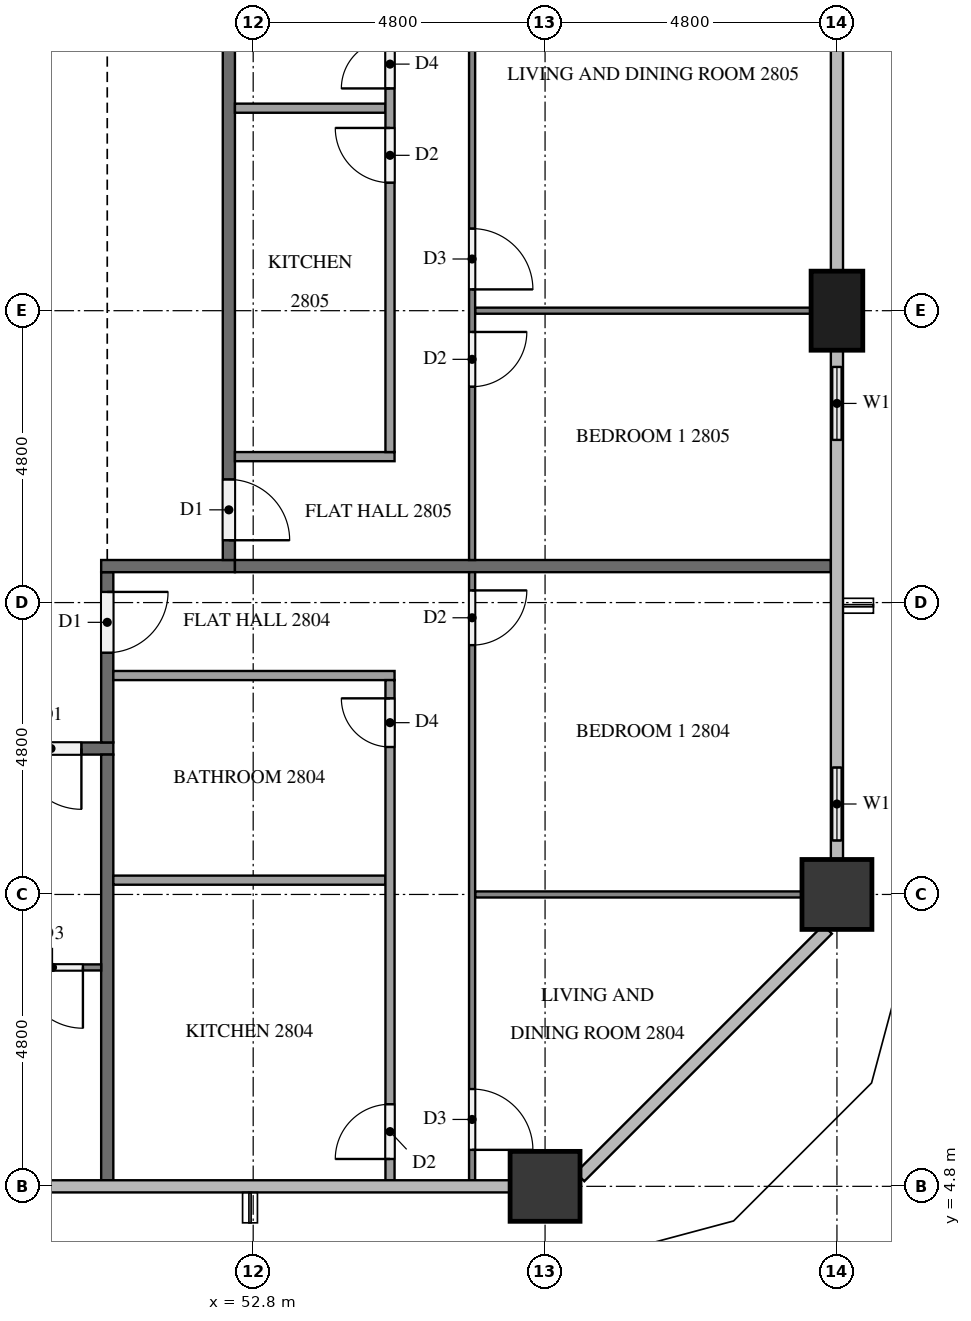
"""IFC4 building model, lengths in metres.
Left out: names, types, materials, properties, quantities, classifications, styles, units other than length and angle.
Written with IfcOpenShell. Run it as: python <this file> out.ifc"""

import sys

from ifc_helpers import new_model, si_unit, direction, frame, frame_2d, origin, origin_2d, place, context, subcontext, project, spatial, rectangle, extrude, element, fill, save


model = new_model("IFC4")
c1 = context("Model", 3, precision=1e-05, world=origin(), true_north=direction((0.0, 1.0)))
c2 = subcontext(c1, "Body", "Model", "MODEL_VIEW")
j1 = project(units=[si_unit("LENGTHUNIT", "METRE"), si_unit("PLANEANGLEUNIT", "RADIAN")], contexts=[c1])
p1 = place(None, origin())
s1 = spatial("IfcSite", under=j1, at=p1, CompositionType="ELEMENT")
p2 = place(p1, origin())
s2 = spatial("IfcBuilding", under=s1, at=p2, CompositionType="ELEMENT")
p3 = place(p2, frame((0.0, 0.0, 110.2)))
s3 = spatial("IfcBuildingStorey", under=s2, at=p3, CompositionType="ELEMENT", Elevation=110.2)
for number, where, z_axis, x_axis in (
    (1, (57.6, 4.8, 0.0), (0.0, 0.0, 1.0), (1.0, 0.0, 0.0)),
    (2, (62.4, 9.6, 0.0), (0.0, 0.0, 1.0), (1.0, 0.0, 0.0)),
):
    element("IfcColumn", number, at=place(p3, frame(where, z_axis=z_axis, x_axis=x_axis)), inside=s3, PredefinedType="COLUMN", context=c2, shape_type="SweptSolid", body=[
        extrude(rectangle(XDim=1.15, YDim=1.15, at=origin_2d()), origin(), (0.0, 0.0, 1.0), 3.1),
    ])
p4 = place(p3, frame((62.4, 19.2, 0.0), z_axis=(0.0, 0.0, 1.0), x_axis=(0.0, 1.0, 0.0)))
e3 = element("IfcColumn", 3, at=p4, inside=s3, PredefinedType="COLUMN", context=c2, shape_type="SweptSolid", body=[
    extrude(rectangle(XDim=1.3, YDim=0.85, at=origin_2d()), origin(), (0.0, 0.0, 1.0), 3.1),
])
p5 = place(p3, frame((62.4, 10.175, 0.0), z_axis=(0.0, 0.0, 1.0), x_axis=(0.0, 1.0, 0.0)))
e4 = element("IfcWall", 4, at=p5, inside=s3, PredefinedType="SOLIDWALL", context=c2, shape_type="SweptSolid", body=[
    extrude(rectangle(XDim=1.825, YDim=0.15, at=frame_2d((0.913, 0.0))), origin(), (0.0, 0.0, 1.0), 3.1),
])
p6 = place(p5, frame((0.312, 0.0, 0.9)))
e5 = element("IfcOpeningElement", 5, at=p6, cuts=e4, PredefinedType="OPENING", context=c2, shape_type="SweptSolid", body=[
    extrude(rectangle(XDim=1.2, YDim=1.4, at=frame_2d((0.6, 0.7))), frame((0.0, 0.085, 0.0), z_axis=(0.0, -1.0, 0.0), x_axis=(1.0, 0.0, 0.0)), (0.0, 0.0, 1.0), 0.17),
])
p7 = place(p3, frame((62.4, 16.8, 0.0), z_axis=(0.0, 0.0, 1.0), x_axis=(0.0, 1.0, 0.0)))
e6 = element("IfcWall", 6, at=p7, inside=s3, PredefinedType="SOLIDWALL", context=c2, shape_type="SweptSolid", body=[
    extrude(rectangle(XDim=1.75, YDim=0.15, at=frame_2d((0.875, 0.0))), origin(), (0.0, 0.0, 1.0), 3.1),
])
p8 = place(p7, frame((0.275, 0.0, 0.9)))
e7 = element("IfcOpeningElement", 7, at=p8, cuts=e6, PredefinedType="OPENING", context=c2, shape_type="SweptSolid", body=[
    extrude(rectangle(XDim=1.2, YDim=1.4, at=frame_2d((0.6, 0.7))), frame((0.0, 0.085, 0.0), z_axis=(0.0, -1.0, 0.0), x_axis=(1.0, 0.0, 0.0)), (0.0, 0.0, 1.0), 0.17),
])
p9 = place(p3, frame((50.5, 12.0, 0.0), z_axis=(0.0, 0.0, 1.0), x_axis=(-1.0, 0.0, 0.0)))
e8 = element("IfcWall", 8, at=p9, inside=s3, PredefinedType="PARTITIONING", context=c2, shape_type="SweptSolid", body=[
    extrude(rectangle(XDim=38.6, YDim=0.2, at=frame_2d((19.3, 0.0))), origin(), (0.0, 0.0, 1.0), 3.1),
])
p10 = place(p9, frame((22.125, 0.0, 0.0)))
e9 = element("IfcOpeningElement", 9, at=p10, cuts=e8, PredefinedType="OPENING", context=c2, shape_type="SweptSolid", body=[
    extrude(rectangle(XDim=1.0, YDim=2.1, at=frame_2d((0.5, 1.05))), frame((0.0, 0.11, 0.0), z_axis=(0.0, -1.0, 0.0), x_axis=(1.0, 0.0, 0.0)), (0.0, 0.0, 1.0), 0.22),
])
p11 = place(p9, frame((20.275, 0.0, 0.0)))
e10 = element("IfcOpeningElement", 10, at=p11, cuts=e8, PredefinedType="OPENING", context=c2, shape_type="SweptSolid", body=[
    extrude(rectangle(XDim=1.0, YDim=2.1, at=frame_2d((0.5, 1.05))), frame((0.0, 0.11, 0.0), z_axis=(0.0, -1.0, 0.0), x_axis=(1.0, 0.0, 0.0)), (0.0, 0.0, 1.0), 0.22),
])
p12 = place(p9, frame((0.525, 0.0, 0.0)))
e11 = element("IfcOpeningElement", 11, at=p12, cuts=e8, PredefinedType="OPENING", context=c2, shape_type="SweptSolid", body=[
    extrude(rectangle(XDim=1.0, YDim=2.1, at=frame_2d((0.5, 1.05))), frame((0.0, 0.11, 0.0), z_axis=(0.0, -1.0, 0.0), x_axis=(1.0, 0.0, 0.0)), (0.0, 0.0, 1.0), 0.22),
])
p13 = place(p3, frame((50.4, 14.9, 0.0), z_axis=(0.0, 0.0, 1.0), x_axis=(0.0, -1.0, 0.0)))
e12 = element("IfcWall", 12, at=p13, inside=s3, PredefinedType="PARTITIONING", context=c2, shape_type="SweptSolid", body=[
    extrude(rectangle(XDim=2.8, YDim=0.2, at=frame_2d((1.4, 0.0))), origin(), (0.0, 0.0, 1.0), 3.1),
])
p14 = place(p13, frame((0.325, 0.0, 0.0)))
e13 = element("IfcOpeningElement", 13, at=p14, cuts=e12, PredefinedType="OPENING", context=c2, shape_type="SweptSolid", body=[
    extrude(rectangle(XDim=1.0, YDim=2.1, at=frame_2d((0.5, 1.05))), frame((0.0, 0.11, 0.0), z_axis=(0.0, -1.0, 0.0), x_axis=(1.0, 0.0, 0.0)), (0.0, 0.0, 1.0), 0.22),
])
p15 = place(p3, frame((50.3, 15.0, 0.0), z_axis=(0.0, 0.0, 1.0), x_axis=(1.0, 0.0, 0.0)))
e14 = element("IfcWall", 14, at=p15, inside=s3, PredefinedType="PARTITIONING", context=c2, shape_type="SweptSolid", body=[
    extrude(rectangle(XDim=2.2, YDim=0.2, at=frame_2d((1.1, 0.0))), origin(), (0.0, 0.0, 1.0), 3.1),
])
p16 = place(p3, frame((52.4, 37.7, 0.0), z_axis=(0.0, 0.0, 1.0), x_axis=(0.0, -1.0, 0.0)))
e15 = element("IfcWall", 15, at=p16, inside=s3, PredefinedType="PARTITIONING", context=c2, shape_type="SweptSolid", body=[
    extrude(rectangle(XDim=22.6, YDim=0.2, at=frame_2d((11.3, 0.0))), origin(), (0.0, 0.0, 1.0), 3.1),
])
p17 = place(p16, frame((21.275, 0.0, 0.0)))
e16 = element("IfcOpeningElement", 16, at=p17, cuts=e15, PredefinedType="OPENING", context=c2, shape_type="SweptSolid", body=[
    extrude(rectangle(XDim=1.0, YDim=2.1, at=frame_2d((0.5, 1.05))), frame((0.0, 0.11, 0.0), z_axis=(0.0, -1.0, 0.0), x_axis=(1.0, 0.0, 0.0)), (0.0, 0.0, 1.0), 0.22),
])
p18 = place(p16, frame((9.875, 0.0, 0.0)))
e17 = element("IfcOpeningElement", 17, at=p18, cuts=e15, PredefinedType="OPENING", context=c2, shape_type="SweptSolid", body=[
    extrude(rectangle(XDim=1.0, YDim=2.1, at=frame_2d((0.5, 1.05))), frame((0.0, 0.11, 0.0), z_axis=(0.0, -1.0, 0.0), x_axis=(1.0, 0.0, 0.0)), (0.0, 0.0, 1.0), 0.22),
])
p19 = place(p3, frame((50.4, 11.9, 0.0), z_axis=(0.0, 0.0, 1.0), x_axis=(0.0, -1.0, 0.0)))
e18 = element("IfcWall", 18, at=p19, inside=s3, PredefinedType="PARTITIONING", context=c2, shape_type="SweptSolid", body=[
    extrude(rectangle(XDim=7.0, YDim=0.2, at=frame_2d((3.5, 0.0))), origin(), (0.0, 0.0, 1.0), 3.1),
])
p20 = place(p3, frame((52.5, 15.0, 0.0), z_axis=(0.0, 0.0, 1.0), x_axis=(1.0, 0.0, 0.0)))
e19 = element("IfcWall", 19, at=p20, inside=s3, PredefinedType="PARTITIONING", context=c2, shape_type="SweptSolid", body=[
    extrude(rectangle(XDim=9.8, YDim=0.2, at=frame_2d((4.9, 0.0))), origin(), (0.0, 0.0, 1.0), 3.1),
])
p21 = place(p3, frame((50.3, 8.4, 0.0), z_axis=(0.0, 0.0, 1.0), x_axis=(-1.0, 0.0, 0.0)))
e20 = element("IfcWall", 20, at=p21, inside=s3, PredefinedType="PARTITIONING", context=c2, shape_type="SweptSolid", body=[
    extrude(rectangle(XDim=11.8, YDim=0.1, at=frame_2d((5.9, 0.0))), origin(), (0.0, 0.0, 1.0), 3.1),
])
p22 = place(p21, frame((0.3, 0.0, 0.0)))
e21 = element("IfcOpeningElement", 21, at=p22, cuts=e20, PredefinedType="OPENING", context=c2, shape_type="SweptSolid", body=[
    extrude(rectangle(XDim=1.0, YDim=2.1, at=frame_2d((0.5, 1.05))), frame((0.0, 0.06, 0.0), z_axis=(0.0, -1.0, 0.0), x_axis=(1.0, 0.0, 0.0)), (0.0, 0.0, 1.0), 0.12),
])
p23 = place(p21, frame((10.6, 0.0, 0.0)))
e22 = element("IfcOpeningElement", 22, at=p23, cuts=e20, PredefinedType="OPENING", context=c2, shape_type="SweptSolid", body=[
    extrude(rectangle(XDim=0.9, YDim=2.1, at=frame_2d((0.45, 1.05))), frame((0.0, 0.06, 0.0), z_axis=(0.0, -1.0, 0.0), x_axis=(1.0, 0.0, 0.0)), (0.0, 0.0, 1.0), 0.12),
])
p24 = place(p3, frame((56.45, 9.6, 0.0), z_axis=(0.0, 0.0, 1.0), x_axis=(1.0, 0.0, 0.0)))
e23 = element("IfcWall", 23, at=p24, inside=s3, PredefinedType="PARTITIONING", context=c2, shape_type="SweptSolid", body=[
    extrude(rectangle(XDim=5.375, YDim=0.1, at=frame_2d((2.688, 0.0))), origin(), (0.0, 0.0, 1.0), 3.1),
])
p25 = place(p3, frame((56.4, 14.9, 0.0), z_axis=(0.0, 0.0, 1.0), x_axis=(0.0, -1.0, 0.0)))
e24 = element("IfcWall", 24, at=p25, inside=s3, PredefinedType="PARTITIONING", context=c2, shape_type="SweptSolid", body=[
    extrude(rectangle(XDim=10.0, YDim=0.1, at=frame_2d((5.0, 0.0))), origin(), (0.0, 0.0, 1.0), 3.1),
])
p26 = place(p25, frame((0.3, 0.0, 0.0)))
e25 = element("IfcOpeningElement", 25, at=p26, cuts=e24, PredefinedType="OPENING", context=c2, shape_type="SweptSolid", body=[
    extrude(rectangle(XDim=0.9, YDim=2.1, at=frame_2d((0.45, 1.05))), frame((0.0, 0.06, 0.0), z_axis=(0.0, -1.0, 0.0), x_axis=(1.0, 0.0, 0.0)), (0.0, 0.0, 1.0), 0.12),
])
p27 = place(p25, frame((8.5, 0.0, 0.0)))
e26 = element("IfcOpeningElement", 26, at=p27, cuts=e24, PredefinedType="OPENING", context=c2, shape_type="SweptSolid", body=[
    extrude(rectangle(XDim=1.0, YDim=2.1, at=frame_2d((0.5, 1.05))), frame((0.0, 0.06, 0.0), z_axis=(0.0, -1.0, 0.0), x_axis=(1.0, 0.0, 0.0)), (0.0, 0.0, 1.0), 0.12),
])
p28 = place(p3, frame((50.5, 9.835, 0.0), z_axis=(0.0, 0.0, 1.0), x_axis=(1.0, 0.0, 0.0)))
e27 = element("IfcWall", 27, at=p28, inside=s3, PredefinedType="PARTITIONING", context=c2, shape_type="SweptSolid", body=[
    extrude(rectangle(XDim=4.475, YDim=0.15, at=frame_2d((2.238, 0.0))), origin(), (0.0, 0.0, 1.0), 3.1),
])
p29 = place(p3, frame((50.5, 13.2, 0.0), z_axis=(0.0, 0.0, 1.0), x_axis=(1.0, 0.0, 0.0)))
e28 = element("IfcWall", 28, at=p29, inside=s3, PredefinedType="PARTITIONING", context=c2, shape_type="SweptSolid", body=[
    extrude(rectangle(XDim=4.625, YDim=0.15, at=frame_2d((2.312, 0.0))), origin(), (0.0, 0.0, 1.0), 3.1),
])
p30 = place(p3, frame((55.05, 4.9, 0.0), z_axis=(0.0, 0.0, 1.0), x_axis=(0.0, 1.0, 0.0)))
e29 = element("IfcWall", 29, at=p30, inside=s3, PredefinedType="PARTITIONING", context=c2, shape_type="SweptSolid", body=[
    extrude(rectangle(XDim=8.225, YDim=0.15, at=frame_2d((4.113, 0.0))), origin(), (0.0, 0.0, 1.0), 3.1),
])
p31 = place(p30, frame((7.125, 0.0, 0.0)))
e30 = element("IfcOpeningElement", 30, at=p31, cuts=e29, PredefinedType="OPENING", context=c2, shape_type="SweptSolid", body=[
    extrude(rectangle(XDim=0.8, YDim=2.1, at=frame_2d((0.4, 1.05))), frame((0.0, 0.085, 0.0), z_axis=(0.0, -1.0, 0.0), x_axis=(1.0, 0.0, 0.0)), (0.0, 0.0, 1.0), 0.17),
])
p32 = place(p30, frame((0.35, 0.0, 0.0)))
e31 = element("IfcOpeningElement", 31, at=p32, cuts=e29, PredefinedType="OPENING", context=c2, shape_type="SweptSolid", body=[
    extrude(rectangle(XDim=0.9, YDim=2.1, at=frame_2d((0.45, 1.05))), frame((0.0, 0.085, 0.0), z_axis=(0.0, -1.0, 0.0), x_axis=(1.0, 0.0, 0.0)), (0.0, 0.0, 1.0), 0.17),
])
p33 = place(p3, frame((56.45, 19.2, 0.0), z_axis=(0.0, 0.0, 1.0), x_axis=(1.0, 0.0, 0.0)))
e32 = element("IfcWall", 32, at=p33, inside=s3, PredefinedType="PARTITIONING", context=c2, shape_type="SweptSolid", body=[
    extrude(rectangle(XDim=5.525, YDim=0.1, at=frame_2d((2.763, 0.0))), origin(), (0.0, 0.0, 1.0), 3.1),
])
p34 = place(p3, frame((56.4, 26.3, 0.0), z_axis=(0.0, 0.0, 1.0), x_axis=(0.0, -1.0, 0.0)))
e33 = element("IfcWall", 33, at=p34, inside=s3, PredefinedType="PARTITIONING", context=c2, shape_type="SweptSolid", body=[
    extrude(rectangle(XDim=11.2, YDim=0.1, at=frame_2d((5.6, 0.0))), origin(), (0.0, 0.0, 1.0), 3.1),
])
p35 = place(p34, frame((7.45, 0.0, 0.0)))
e34 = element("IfcOpeningElement", 34, at=p35, cuts=e33, PredefinedType="OPENING", context=c2, shape_type="SweptSolid", body=[
    extrude(rectangle(XDim=0.9, YDim=2.1, at=frame_2d((0.45, 1.05))), frame((0.0, 0.06, 0.0), z_axis=(0.0, -1.0, 0.0), x_axis=(1.0, 0.0, 0.0)), (0.0, 0.0, 1.0), 0.12),
])
p36 = place(p34, frame((5.75, 0.0, 0.0)))
e35 = element("IfcOpeningElement", 35, at=p36, cuts=e33, PredefinedType="OPENING", context=c2, shape_type="SweptSolid", body=[
    extrude(rectangle(XDim=1.0, YDim=2.1, at=frame_2d((0.5, 1.05))), frame((0.0, 0.06, 0.0), z_axis=(0.0, -1.0, 0.0), x_axis=(1.0, 0.0, 0.0)), (0.0, 0.0, 1.0), 0.12),
])
p37 = place(p3, frame((52.5, 22.53, 0.0), z_axis=(0.0, 0.0, 1.0), x_axis=(1.0, 0.0, 0.0)))
e36 = element("IfcWall", 36, at=p37, inside=s3, PredefinedType="PARTITIONING", context=c2, shape_type="SweptSolid", body=[
    extrude(rectangle(XDim=2.475, YDim=0.15, at=frame_2d((1.238, 0.0))), origin(), (0.0, 0.0, 1.0), 3.1),
])
p38 = place(p3, frame((52.5, 16.8, 0.0), z_axis=(0.0, 0.0, 1.0), x_axis=(1.0, 0.0, 0.0)))
e37 = element("IfcWall", 37, at=p38, inside=s3, PredefinedType="PARTITIONING", context=c2, shape_type="SweptSolid", body=[
    extrude(rectangle(XDim=2.625, YDim=0.15, at=frame_2d((1.312, 0.0))), origin(), (0.0, 0.0, 1.0), 3.1),
])
p39 = place(p3, frame((55.05, 16.875, 0.0), z_axis=(0.0, 0.0, 1.0), x_axis=(0.0, 1.0, 0.0)))
e38 = element("IfcWall", 38, at=p39, inside=s3, PredefinedType="PARTITIONING", context=c2, shape_type="SweptSolid", body=[
    extrude(rectangle(XDim=9.425, YDim=0.15, at=frame_2d((4.712, 0.0))), origin(), (0.0, 0.0, 1.0), 3.1),
])
p40 = place(p39, frame((4.43, 0.0, 0.0)))
e39 = element("IfcOpeningElement", 39, at=p40, cuts=e38, PredefinedType="OPENING", context=c2, shape_type="SweptSolid", body=[
    extrude(rectangle(XDim=0.9, YDim=2.1, at=frame_2d((0.45, 1.05))), frame((0.0, 0.085, 0.0), z_axis=(0.0, -1.0, 0.0), x_axis=(1.0, 0.0, 0.0)), (0.0, 0.0, 1.0), 0.17),
])
p41 = place(p39, frame((5.98, 0.0, 0.0)))
e40 = element("IfcOpeningElement", 40, at=p41, cuts=e38, PredefinedType="OPENING", context=c2, shape_type="SweptSolid", body=[
    extrude(rectangle(XDim=0.8, YDim=2.1, at=frame_2d((0.4, 1.05))), frame((0.0, 0.085, 0.0), z_axis=(0.0, -1.0, 0.0), x_axis=(1.0, 0.0, 0.0)), (0.0, 0.0, 1.0), 0.17),
])
p42 = place(p6, origin())
e41 = element("IfcWindow", 41, at=p42, inside=s3, PartitioningType="SINGLE_PANEL", PredefinedType="WINDOW", context=c2, shape_type="SweptSolid", body=[
    extrude(rectangle(XDim=1.2, YDim=1.4, at=frame_2d((0.6, 0.7))), frame((0.0, 0.03, 0.0), z_axis=(0.0, -1.0, 0.0), x_axis=(1.0, 0.0, 0.0)), (0.0, 0.0, 1.0), 0.06),
])
fill(e5, e41)
p43 = place(p8, origin())
e42 = element("IfcWindow", 42, at=p43, inside=s3, PartitioningType="SINGLE_PANEL", PredefinedType="WINDOW", context=c2, shape_type="SweptSolid", body=[
    extrude(rectangle(XDim=1.2, YDim=1.4, at=frame_2d((0.6, 0.7))), frame((0.0, 0.03, 0.0), z_axis=(0.0, -1.0, 0.0), x_axis=(1.0, 0.0, 0.0)), (0.0, 0.0, 1.0), 0.06),
])
fill(e7, e42)
p44 = place(p12, origin())
e43 = element("IfcDoor", 43, at=p44, inside=s3, OperationType="SINGLE_SWING_LEFT", PredefinedType="DOOR", context=c2, shape_type="SweptSolid", body=[
    extrude(rectangle(XDim=1.0, YDim=2.1, at=frame_2d((0.5, 1.05))), frame((0.0, 0.025, 0.0), z_axis=(0.0, -1.0, 0.0), x_axis=(1.0, 0.0, 0.0)), (0.0, 0.0, 1.0), 0.05),
])
fill(e11, e43)
p45 = place(p14, origin())
e44 = element("IfcDoor", 44, at=p45, inside=s3, OperationType="SINGLE_SWING_LEFT", PredefinedType="DOOR", context=c2, shape_type="SweptSolid", body=[
    extrude(rectangle(XDim=1.0, YDim=2.1, at=frame_2d((0.5, 1.05))), frame((0.0, 0.025, 0.0), z_axis=(0.0, -1.0, 0.0), x_axis=(1.0, 0.0, 0.0)), (0.0, 0.0, 1.0), 0.05),
])
fill(e13, e44)
p46 = place(p17, origin())
e45 = element("IfcDoor", 45, at=p46, inside=s3, OperationType="SINGLE_SWING_RIGHT", PredefinedType="DOOR", context=c2, shape_type="SweptSolid", body=[
    extrude(rectangle(XDim=1.0, YDim=2.1, at=frame_2d((0.5, 1.05))), frame((0.0, 0.025, 0.0), z_axis=(0.0, -1.0, 0.0), x_axis=(1.0, 0.0, 0.0)), (0.0, 0.0, 1.0), 0.05),
])
fill(e16, e45)
p47 = place(p22, origin())
e46 = element("IfcDoor", 46, at=p47, inside=s3, OperationType="SINGLE_SWING_LEFT", PredefinedType="DOOR", context=c2, shape_type="SweptSolid", body=[
    extrude(rectangle(XDim=1.0, YDim=2.1, at=frame_2d((0.5, 1.05))), frame((0.0, 0.025, 0.0), z_axis=(0.0, -1.0, 0.0), x_axis=(1.0, 0.0, 0.0)), (0.0, 0.0, 1.0), 0.05),
])
fill(e21, e46)
p48 = place(p26, origin())
e47 = element("IfcDoor", 47, at=p48, inside=s3, OperationType="SINGLE_SWING_LEFT", PredefinedType="DOOR", context=c2, shape_type="SweptSolid", body=[
    extrude(rectangle(XDim=0.9, YDim=2.1, at=frame_2d((0.45, 1.05))), frame((0.0, 0.025, 0.0), z_axis=(0.0, -1.0, 0.0), x_axis=(1.0, 0.0, 0.0)), (0.0, 0.0, 1.0), 0.05),
])
fill(e25, e47)
p49 = place(p27, origin())
e48 = element("IfcDoor", 48, at=p49, inside=s3, OperationType="SINGLE_SWING_RIGHT", PredefinedType="DOOR", context=c2, shape_type="SweptSolid", body=[
    extrude(rectangle(XDim=1.0, YDim=2.1, at=frame_2d((0.5, 1.05))), frame((0.0, 0.025, 0.0), z_axis=(0.0, -1.0, 0.0), x_axis=(1.0, 0.0, 0.0)), (0.0, 0.0, 1.0), 0.05),
])
fill(e26, e48)
p50 = place(p31, origin())
e49 = element("IfcDoor", 49, at=p50, inside=s3, OperationType="SINGLE_SWING_RIGHT", PredefinedType="DOOR", context=c2, shape_type="SweptSolid", body=[
    extrude(rectangle(XDim=0.8, YDim=2.1, at=frame_2d((0.4, 1.05))), frame((0.0, 0.025, 0.0), z_axis=(0.0, -1.0, 0.0), x_axis=(1.0, 0.0, 0.0)), (0.0, 0.0, 1.0), 0.05),
])
fill(e30, e49)
p51 = place(p32, origin())
e50 = element("IfcDoor", 50, at=p51, inside=s3, OperationType="SINGLE_SWING_LEFT", PredefinedType="DOOR", context=c2, shape_type="SweptSolid", body=[
    extrude(rectangle(XDim=0.9, YDim=2.1, at=frame_2d((0.45, 1.05))), frame((0.0, 0.025, 0.0), z_axis=(0.0, -1.0, 0.0), x_axis=(1.0, 0.0, 0.0)), (0.0, 0.0, 1.0), 0.05),
])
fill(e31, e50)
p52 = place(p35, origin())
e51 = element("IfcDoor", 51, at=p52, inside=s3, OperationType="SINGLE_SWING_LEFT", PredefinedType="DOOR", context=c2, shape_type="SweptSolid", body=[
    extrude(rectangle(XDim=0.9, YDim=2.1, at=frame_2d((0.45, 1.05))), frame((0.0, 0.025, 0.0), z_axis=(0.0, -1.0, 0.0), x_axis=(1.0, 0.0, 0.0)), (0.0, 0.0, 1.0), 0.05),
])
fill(e34, e51)
p53 = place(p36, origin())
e52 = element("IfcDoor", 52, at=p53, inside=s3, OperationType="SINGLE_SWING_RIGHT", PredefinedType="DOOR", context=c2, shape_type="SweptSolid", body=[
    extrude(rectangle(XDim=1.0, YDim=2.1, at=frame_2d((0.5, 1.05))), frame((0.0, 0.025, 0.0), z_axis=(0.0, -1.0, 0.0), x_axis=(1.0, 0.0, 0.0)), (0.0, 0.0, 1.0), 0.05),
])
fill(e35, e52)
p54 = place(p40, origin())
e53 = element("IfcDoor", 53, at=p54, inside=s3, OperationType="SINGLE_SWING_RIGHT", PredefinedType="DOOR", context=c2, shape_type="SweptSolid", body=[
    extrude(rectangle(XDim=0.9, YDim=2.1, at=frame_2d((0.45, 1.05))), frame((0.0, 0.025, 0.0), z_axis=(0.0, -1.0, 0.0), x_axis=(1.0, 0.0, 0.0)), (0.0, 0.0, 1.0), 0.05),
])
fill(e39, e53)
p55 = place(p41, origin())
e54 = element("IfcDoor", 54, at=p55, inside=s3, OperationType="SINGLE_SWING_LEFT", PredefinedType="DOOR", context=c2, shape_type="SweptSolid", body=[
    extrude(rectangle(XDim=0.8, YDim=2.1, at=frame_2d((0.4, 1.05))), frame((0.0, 0.025, 0.0), z_axis=(0.0, -1.0, 0.0), x_axis=(1.0, 0.0, 0.0)), (0.0, 0.0, 1.0), 0.05),
])
fill(e40, e54)
save(model, sys.argv[1])
